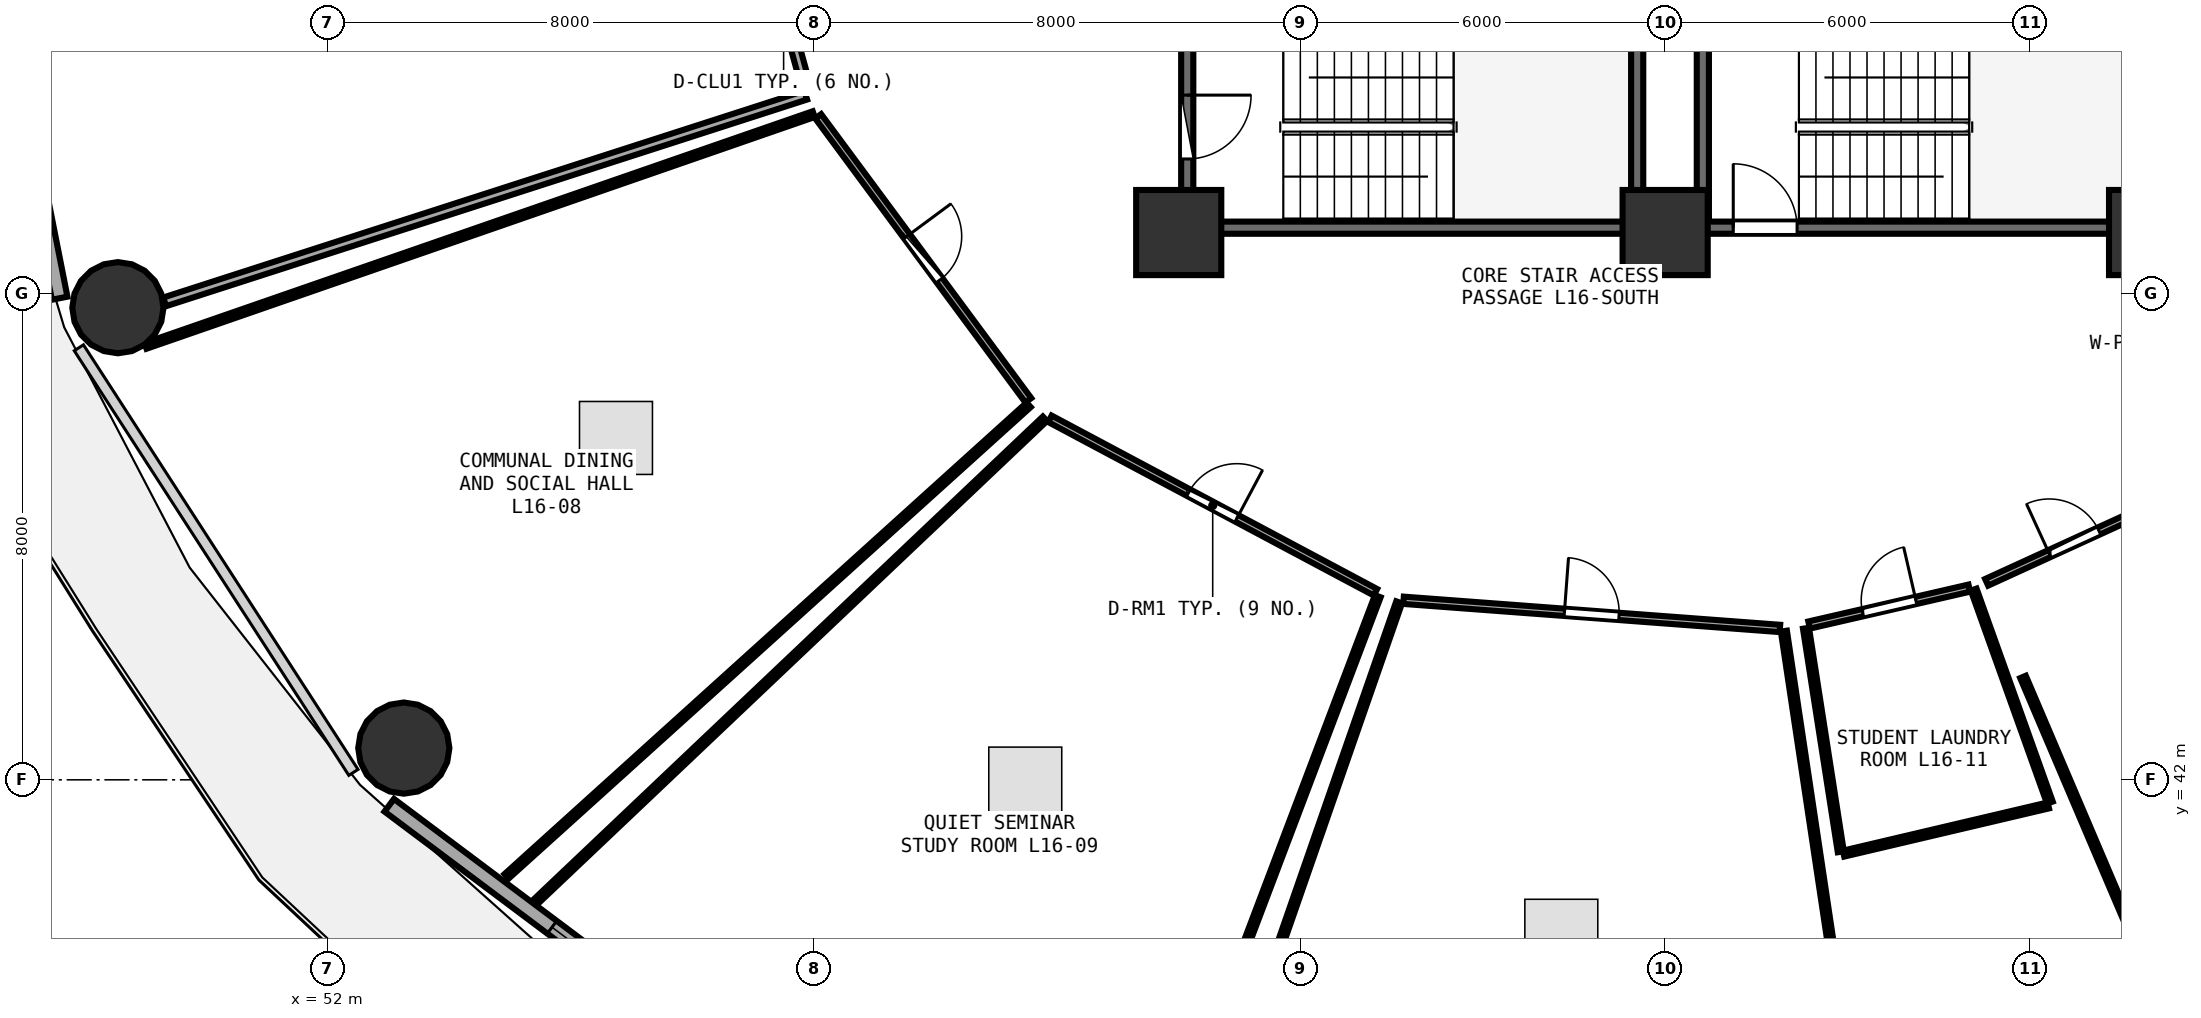
"""IFC4 building model, lengths in metres.
Left out: names, types, materials, properties, quantities, classifications, styles, units other than length and angle.
Written with IfcOpenShell. Run it as: python <this file> out.ifc"""

import sys

from ifc_helpers import new_model, si_unit, direction, frame, frame_2d, origin, origin_2d, place, context, subcontext, project, spatial, rectangle, circle, extrude, element, fill, save


model = new_model("IFC4")
c1 = context("Model", 3, precision=1e-05, world=origin(), true_north=direction((0.0, 1.0)))
c2 = subcontext(c1, "Body", "Model", "MODEL_VIEW")
j1 = project(units=[si_unit("LENGTHUNIT", "METRE"), si_unit("PLANEANGLEUNIT", "RADIAN")], contexts=[c1])
p1 = place(None, origin())
s1 = spatial("IfcSite", under=j1, at=p1, CompositionType="ELEMENT")
p2 = place(p1, origin())
s2 = spatial("IfcBuilding", under=s1, at=p2, CompositionType="ELEMENT")
p3 = place(p2, frame((0.0, 0.0, 63.75)))
s3 = spatial("IfcBuildingStorey", under=s2, at=p3, CompositionType="ELEMENT", Elevation=63.75)
for number, where, z_axis, x_axis in (
    (1, (66.0, 51.0, 0.0), (0.0, 0.0, 1.0), (1.0, 0.0, 0.0)),
    (2, (74.0, 51.0, 0.0), (0.0, 0.0, 1.0), (1.0, 0.0, 0.0)),
    (3, (82.0, 51.0, 0.0), (0.0, 0.0, 1.0), (1.0, 0.0, 0.0)),
):
    element("IfcColumn", number, at=place(p3, frame(where, z_axis=z_axis, x_axis=x_axis)), inside=s3, PredefinedType="PILASTER", context=c2, shape_type="SweptSolid", body=[
        extrude(rectangle(XDim=1.4, YDim=1.4, at=origin_2d()), origin(), (0.0, 0.0, 1.0), 3.75),
    ])
for number, where, z_axis, x_axis in (
    (4, (48.553, 49.764, 0.0), (0.0, 0.0, 1.0), (1.0, 0.0, 0.0)),
    (5, (53.256, 42.522, 0.0), (0.0, 0.0, 1.0), (1.0, 0.0, 0.0)),
):
    element("IfcColumn", number, at=place(p3, frame(where, z_axis=z_axis, x_axis=x_axis)), inside=s3, PredefinedType="COLUMN", context=c2, shape_type="SweptSolid", body=[
        extrude(circle(Radius=0.75, at=origin_2d()), origin(), (0.0, 0.0, 1.0), 3.75),
    ])
p4 = place(p3, frame((46.104, 57.477, 0.0), z_axis=(0.0, 0.0, 1.0), x_axis=(0.193726159581, -0.98105564322, 0.0)))
e6 = element("IfcWall", 6, at=p4, inside=s3, PredefinedType="SOLIDWALL", context=c2, shape_type="SweptSolid", body=[
    extrude(rectangle(XDim=7.703, YDim=0.26, at=frame_2d((3.851, 0.0))), origin(), (0.0, 0.0, 1.0), 3.475),
])
p5 = place(p4, frame((3.051, 0.0, 0.85)))
e7 = element("IfcOpeningElement", 7, at=p5, cuts=e6, PredefinedType="OPENING", context=c2, shape_type="SweptSolid", body=[
    extrude(rectangle(XDim=1.6, YDim=1.45, at=frame_2d((0.8, 0.725))), frame((0.0, 0.14, 0.0), z_axis=(0.0, -1.0, 0.0), x_axis=(1.0, 0.0, 0.0)), (0.0, 0.0, 1.0), 0.28),
])
p6 = place(p3, frame((53.016, 41.582, 0.0), z_axis=(0.0, 0.0, 1.0), x_axis=(0.80030733173, -0.599590005569, 0.0)))
e8 = element("IfcWall", 8, at=p6, inside=s3, PredefinedType="SOLIDWALL", context=c2, shape_type="SweptSolid", body=[
    extrude(rectangle(XDim=8.291, YDim=0.26, at=frame_2d((4.145, 0.0))), origin(), (0.0, 0.0, 1.0), 3.475),
])
p7 = place(p6, frame((3.345, 0.0, 0.85)))
e9 = element("IfcOpeningElement", 9, at=p7, cuts=e8, PredefinedType="OPENING", context=c2, shape_type="SweptSolid", body=[
    extrude(rectangle(XDim=1.6, YDim=1.45, at=frame_2d((0.8, 0.725))), frame((0.0, 0.14, 0.0), z_axis=(0.0, -1.0, 0.0), x_axis=(1.0, 0.0, 0.0)), (0.0, 0.0, 1.0), 0.28),
])
p8 = place(p3, frame((74.0, 51.08, 0.0), z_axis=(0.0, 0.0, 1.0), x_axis=(1.0, 0.0, 0.0)))
e10 = element("IfcWall", 10, at=p8, inside=s3, PredefinedType="SHEAR", context=c2, shape_type="SweptSolid", body=[
    extrude(rectangle(XDim=7.9, YDim=0.2, at=frame_2d((3.95, 0.0))), origin(), (0.0, 0.0, 1.0), 3.49),
])
p9 = place(p8, frame((1.12, 0.0, 0.0)))
e11 = element("IfcOpeningElement", 11, at=p9, cuts=e10, PredefinedType="OPENING", context=c2, shape_type="SweptSolid", body=[
    extrude(rectangle(XDim=1.05, YDim=2.1, at=frame_2d((0.525, 1.05))), frame((0.0, 0.11, 0.0), z_axis=(0.0, -1.0, 0.0), x_axis=(1.0, 0.0, 0.0)), (0.0, 0.0, 1.0), 0.22),
])
p10 = place(p3, frame((74.62, 54.27, 0.0), z_axis=(0.0, 0.0, 1.0), x_axis=(0.0, -1.0, 0.0)))
e12 = element("IfcWall", 12, at=p10, inside=s3, PredefinedType="SHEAR", context=c2, shape_type="SweptSolid", body=[
    extrude(rectangle(XDim=3.07, YDim=0.2, at=frame_2d((1.535, 0.0))), origin(), (0.0, 0.0, 1.0), 3.49),
])
p11 = place(p3, frame((66.26, 51.08, 0.0), z_axis=(0.0, 0.0, 1.0), x_axis=(1.0, 0.0, 0.0)))
e13 = element("IfcWall", 13, at=p11, inside=s3, PredefinedType="SHEAR", context=c2, shape_type="SweptSolid", body=[
    extrude(rectangle(XDim=7.16, YDim=0.2, at=frame_2d((3.58, 0.0))), origin(), (0.0, 0.0, 1.0), 3.49),
])
p12 = place(p3, frame((73.54, 51.2, 0.0), z_axis=(0.0, 0.0, 1.0), x_axis=(0.0, 1.0, 0.0)))
e14 = element("IfcWall", 14, at=p12, inside=s3, PredefinedType="SHEAR", context=c2, shape_type="SweptSolid", body=[
    extrude(rectangle(XDim=3.07, YDim=0.2, at=frame_2d((1.535, 0.0))), origin(), (0.0, 0.0, 1.0), 3.49),
])
p13 = place(p3, frame((66.14, 54.27, 0.0), z_axis=(0.0, 0.0, 1.0), x_axis=(0.0, -1.0, 0.0)))
e15 = element("IfcWall", 15, at=p13, inside=s3, PredefinedType="SHEAR", context=c2, shape_type="SweptSolid", body=[
    extrude(rectangle(XDim=3.07, YDim=0.2, at=frame_2d((1.535, 0.0))), origin(), (0.0, 0.0, 1.0), 3.49),
])
p14 = place(p13, frame((1.01, 0.0, 0.0)))
e16 = element("IfcOpeningElement", 16, at=p14, cuts=e15, PredefinedType="OPENING", context=c2, shape_type="SweptSolid", body=[
    extrude(rectangle(XDim=1.05, YDim=2.1, at=frame_2d((0.525, 1.05))), frame((0.0, 0.11, 0.0), z_axis=(0.0, -1.0, 0.0), x_axis=(1.0, 0.0, 0.0)), (0.0, 0.0, 1.0), 0.22),
])
p15 = place(p3, frame((59.116, 56.155, 0.0), z_axis=(0.0, 0.0, 1.0), x_axis=(0.263653235341, -0.964617526014, 0.0)))
e17 = element("IfcWall", 17, at=p15, inside=s3, PredefinedType="PARTITIONING", context=c2, shape_type="SweptSolid", body=[
    extrude(rectangle(XDim=2.93, YDim=0.15, at=frame_2d((1.465, 0.0))), origin(), (0.0, 0.0, 1.0), 3.48),
])
p16 = place(p15, frame((0.99, 0.0, 0.0)))
e18 = element("IfcOpeningElement", 18, at=p16, cuts=e17, PredefinedType="OPENING", context=c2, shape_type="SweptSolid", body=[
    extrude(rectangle(XDim=0.95, YDim=2.08, at=frame_2d((0.475, 1.04))), frame((0.0, 0.085, 0.0), z_axis=(0.0, -1.0, 0.0), x_axis=(1.0, 0.0, 0.0)), (0.0, 0.0, 1.0), 0.17),
])
p17 = place(p3, frame((60.071, 52.912, 0.0), z_axis=(0.0, 0.0, 1.0), x_axis=(0.594763174801, -0.80390096772, 0.0)))
e19 = element("IfcWall", 19, at=p17, inside=s3, PredefinedType="PARTITIONING", context=c2, shape_type="SweptSolid", body=[
    extrude(rectangle(XDim=5.81, YDim=0.12, at=frame_2d((2.905, 0.0))), origin(), (0.0, 0.0, 1.0), 2.875),
])
p18 = place(p17, frame((2.455, 0.0, 0.0)))
e20 = element("IfcOpeningElement", 20, at=p18, cuts=e19, PredefinedType="OPENING", context=c2, shape_type="SweptSolid", body=[
    extrude(rectangle(XDim=0.9, YDim=2.08, at=frame_2d((0.45, 1.04))), frame((0.0, 0.07, 0.0), z_axis=(0.0, -1.0, 0.0), x_axis=(1.0, 0.0, 0.0)), (0.0, 0.0, 1.0), 0.14),
])
p19 = place(p3, frame((63.882, 47.937, 0.0), z_axis=(0.0, 0.0, 1.0), x_axis=(0.882584601599, -0.470153614279, 0.0)))
e21 = element("IfcWall", 21, at=p19, inside=s3, PredefinedType="PARTITIONING", context=c2, shape_type="SweptSolid", body=[
    extrude(rectangle(XDim=6.065, YDim=0.12, at=frame_2d((3.033, 0.0))), origin(), (0.0, 0.0, 1.0), 2.875),
])
p20 = place(p19, frame((2.583, 0.0, 0.0)))
e22 = element("IfcOpeningElement", 22, at=p20, cuts=e21, PredefinedType="OPENING", context=c2, shape_type="SweptSolid", body=[
    extrude(rectangle(XDim=0.9, YDim=2.08, at=frame_2d((0.45, 1.04))), frame((0.0, 0.07, 0.0), z_axis=(0.0, -1.0, 0.0), x_axis=(1.0, 0.0, 0.0)), (0.0, 0.0, 1.0), 0.14),
])
p21 = place(p3, frame((69.698, 44.952, 0.0), z_axis=(0.0, 0.0, 1.0), x_axis=(0.997215128993, -0.074578726908, 0.0)))
e23 = element("IfcWall", 23, at=p21, inside=s3, PredefinedType="PARTITIONING", context=c2, shape_type="SweptSolid", body=[
    extrude(rectangle(XDim=6.207, YDim=0.12, at=frame_2d((3.104, 0.0))), origin(), (0.0, 0.0, 1.0), 3.235),
])
p22 = place(p21, frame((2.653, 0.0, 0.0)))
e24 = element("IfcOpeningElement", 24, at=p22, cuts=e23, PredefinedType="OPENING", context=c2, shape_type="SweptSolid", body=[
    extrude(rectangle(XDim=0.9, YDim=2.08, at=frame_2d((0.45, 1.04))), frame((0.0, 0.07, 0.0), z_axis=(0.0, -1.0, 0.0), x_axis=(1.0, 0.0, 0.0)), (0.0, 0.0, 1.0), 0.14),
])
p23 = place(p3, frame((76.368, 44.545, 0.0), z_axis=(0.0, 0.0, 1.0), x_axis=(0.974445966729, 0.224622033484, 0.0)))
e25 = element("IfcWall", 25, at=p23, inside=s3, PredefinedType="PARTITIONING", context=c2, shape_type="SweptSolid", body=[
    extrude(rectangle(XDim=2.703, YDim=0.12, at=frame_2d((1.352, 0.0))), origin(), (0.0, 0.0, 1.0), 3.235),
])
p24 = place(p23, frame((0.902, 0.0, 0.0)))
e26 = element("IfcOpeningElement", 26, at=p24, cuts=e25, PredefinedType="OPENING", context=c2, shape_type="SweptSolid", body=[
    extrude(rectangle(XDim=0.9, YDim=2.08, at=frame_2d((0.45, 1.04))), frame((0.0, 0.07, 0.0), z_axis=(0.0, -1.0, 0.0), x_axis=(1.0, 0.0, 0.0)), (0.0, 0.0, 1.0), 0.14),
])
p25 = place(p3, frame((79.288, 45.248, 0.0), z_axis=(0.0, 0.0, 1.0), x_axis=(0.909426123825, 0.415865513483, 0.0)))
e27 = element("IfcWall", 27, at=p25, inside=s3, PredefinedType="PARTITIONING", context=c2, shape_type="SweptSolid", body=[
    extrude(rectangle(XDim=3.164, YDim=0.12, at=frame_2d((1.582, 0.0))), origin(), (0.0, 0.0, 1.0), 2.875),
])
p26 = place(p25, frame((1.132, 0.0, 0.0)))
e28 = element("IfcOpeningElement", 28, at=p26, cuts=e27, PredefinedType="OPENING", context=c2, shape_type="SweptSolid", body=[
    extrude(rectangle(XDim=0.9, YDim=2.08, at=frame_2d((0.45, 1.04))), frame((0.0, 0.07, 0.0), z_axis=(0.0, -1.0, 0.0), x_axis=(1.0, 0.0, 0.0)), (0.0, 0.0, 1.0), 0.14),
])
p27 = place(p3, frame((59.866, 53.259, 0.0), z_axis=(0.0, 0.0, 1.0), x_axis=(-0.951774856366, -0.30679736438, 0.0)))
e29 = element("IfcWall", 29, at=p27, inside=s3, PredefinedType="PARTITIONING", context=c2, shape_type="SweptSolid", body=[
    extrude(rectangle(XDim=11.078, YDim=0.15, at=frame_2d((5.539, 0.0))), origin(), (0.0, 0.0, 1.0), 2.875),
])
p28 = place(p3, frame((63.532, 48.166, 0.0), z_axis=(0.0, 0.0, 1.0), x_axis=(-0.742191353367, -0.670188029577, 0.0)))
e30 = element("IfcWall", 30, at=p28, inside=s3, PredefinedType="PARTITIONING", context=c2, shape_type="SweptSolid", body=[
    extrude(rectangle(XDim=11.569, YDim=0.1, at=frame_2d((5.785, 0.0))), origin(), (0.0, 0.0, 1.0), 2.875),
])
p29 = place(p3, frame((49.008, 49.136, 0.0), z_axis=(0.0, 0.0, 1.0), x_axis=(0.944815756918, 0.327602175634, 0.0)))
e31 = element("IfcWall", 31, at=p29, inside=s3, PredefinedType="PARTITIONING", context=c2, shape_type="SweptSolid", body=[
    extrude(rectangle(XDim=11.632, YDim=0.1, at=frame_2d((5.816, 0.0))), origin(), (0.0, 0.0, 1.0), 2.875),
])
p30 = place(p3, frame((69.274, 45.02, 0.0), z_axis=(0.0, 0.0, 1.0), x_axis=(-0.354325845477, -0.935122021571, 0.0)))
e32 = element("IfcWall", 32, at=p30, inside=s3, PredefinedType="PARTITIONING", context=c2, shape_type="SweptSolid", body=[
    extrude(rectangle(XDim=10.938, YDim=0.1, at=frame_2d((5.469, 0.0))), origin(), (0.0, 0.0, 1.0), 2.875),
])
p31 = place(p3, frame((55.433, 40.003, 0.0), z_axis=(0.0, 0.0, 1.0), x_axis=(0.725627678847, 0.688087546531, 0.0)))
e33 = element("IfcWall", 33, at=p31, inside=s3, PredefinedType="PARTITIONING", context=c2, shape_type="SweptSolid", body=[
    extrude(rectangle(XDim=11.531, YDim=0.1, at=frame_2d((5.765, 0.0))), origin(), (0.0, 0.0, 1.0), 2.875),
])
p32 = place(p3, frame((75.953, 44.445, 0.0), z_axis=(0.0, 0.0, 1.0), x_axis=(0.148282966471, -0.988944974129, 0.0)))
e34 = element("IfcWall", 34, at=p32, inside=s3, PredefinedType="PARTITIONING", context=c2, shape_type="SweptSolid", body=[
    extrude(rectangle(XDim=10.799, YDim=0.1, at=frame_2d((5.399, 0.0))), origin(), (0.0, 0.0, 1.0), 2.875),
])
p33 = place(p3, frame((66.038, 34.612, 0.0), z_axis=(0.0, 0.0, 1.0), x_axis=(0.328662915274, 0.944447292401, 0.0)))
e35 = element("IfcWall", 35, at=p33, inside=s3, PredefinedType="PARTITIONING", context=c2, shape_type="SweptSolid", body=[
    extrude(rectangle(XDim=10.914, YDim=0.1, at=frame_2d((5.457, 0.0))), origin(), (0.0, 0.0, 1.0), 2.875),
])
p34 = place(p3, frame((79.074, 45.128, 0.0), z_axis=(0.0, 0.0, 1.0), x_axis=(0.336806149261, -0.941574010803, 0.0)))
e36 = element("IfcWall", 36, at=p34, inside=s3, PredefinedType="PARTITIONING", context=c2, shape_type="SweptSolid", body=[
    extrude(rectangle(XDim=3.72, YDim=0.1, at=frame_2d((1.86, 0.0))), origin(), (0.0, 0.0, 1.0), 2.875),
])
p35 = place(p3, frame((80.302, 41.579, 0.0), z_axis=(0.0, 0.0, 1.0), x_axis=(-0.973403286496, -0.229098323518, 0.0)))
e37 = element("IfcWall", 37, at=p35, inside=s3, PredefinedType="PARTITIONING", context=c2, shape_type="SweptSolid", body=[
    extrude(rectangle(XDim=3.46, YDim=0.1, at=frame_2d((1.73, 0.0))), origin(), (0.0, 0.0, 1.0), 2.875),
])
p36 = place(p3, frame((76.889, 40.816, 0.0), z_axis=(0.0, 0.0, 1.0), x_axis=(-0.153950475789, 0.988078565198, 0.0)))
e38 = element("IfcWall", 38, at=p36, inside=s3, PredefinedType="PARTITIONING", context=c2, shape_type="SweptSolid", body=[
    extrude(rectangle(XDim=3.72, YDim=0.1, at=frame_2d((1.86, 0.0))), origin(), (0.0, 0.0, 1.0), 3.175),
])
p37 = place(p3, frame((83.553, 35.089, 0.0), z_axis=(0.0, 0.0, 1.0), x_axis=(-0.392154212845, 0.919899490895, 0.0)))
e39 = element("IfcWall", 39, at=p37, inside=s3, PredefinedType="PARTITIONING", context=c2, shape_type="SweptSolid", body=[
    extrude(rectangle(XDim=9.352, YDim=0.1, at=frame_2d((4.676, 0.0))), origin(), (0.0, 0.0, 1.0), 2.875),
])
p38 = place(p7, origin())
e40 = element("IfcWindow", 40, at=p38, inside=s3, PartitioningType="SINGLE_PANEL", PredefinedType="WINDOW", context=c2, shape_type="SweptSolid", body=[
    extrude(rectangle(XDim=1.6, YDim=1.45, at=frame_2d((0.8, 0.725))), frame((0.0, 0.03, 0.0), z_axis=(0.0, -1.0, 0.0), x_axis=(1.0, 0.0, 0.0)), (0.0, 0.0, 1.0), 0.06),
])
fill(e9, e40)
p39 = place(p9, origin())
e41 = element("IfcDoor", 41, at=p39, inside=s3, OperationType="SINGLE_SWING_LEFT", PredefinedType="DOOR", context=c2, shape_type="SweptSolid", body=[
    extrude(rectangle(XDim=1.05, YDim=2.1, at=frame_2d((0.525, 1.05))), frame((0.0, 0.025, 0.0), z_axis=(0.0, -1.0, 0.0), x_axis=(1.0, 0.0, 0.0)), (0.0, 0.0, 1.0), 0.05),
])
fill(e11, e41)
p40 = place(p14, origin())
e42 = element("IfcDoor", 42, at=p40, inside=s3, OperationType="SINGLE_SWING_LEFT", PredefinedType="DOOR", context=c2, shape_type="SweptSolid", body=[
    extrude(rectangle(XDim=1.05, YDim=2.1, at=frame_2d((0.525, 1.05))), frame((0.0, 0.025, 0.0), z_axis=(0.0, -1.0, 0.0), x_axis=(1.0, 0.0, 0.0)), (0.0, 0.0, 1.0), 0.05),
])
fill(e16, e42)
p41 = place(p18, origin())
e43 = element("IfcDoor", 43, at=p41, inside=s3, OperationType="SINGLE_SWING_LEFT", PredefinedType="DOOR", context=c2, shape_type="SweptSolid", body=[
    extrude(rectangle(XDim=0.9, YDim=2.08, at=frame_2d((0.45, 1.04))), frame((0.0, 0.025, 0.0), z_axis=(0.0, -1.0, 0.0), x_axis=(1.0, 0.0, 0.0)), (0.0, 0.0, 1.0), 0.05),
])
fill(e20, e43)
p42 = place(p20, origin())
e44 = element("IfcDoor", 44, at=p42, inside=s3, OperationType="SINGLE_SWING_RIGHT", PredefinedType="DOOR", context=c2, shape_type="SweptSolid", body=[
    extrude(rectangle(XDim=0.9, YDim=2.08, at=frame_2d((0.45, 1.04))), frame((0.0, 0.025, 0.0), z_axis=(0.0, -1.0, 0.0), x_axis=(1.0, 0.0, 0.0)), (0.0, 0.0, 1.0), 0.05),
])
fill(e22, e44)
p43 = place(p22, origin())
e45 = element("IfcDoor", 45, at=p43, inside=s3, OperationType="SINGLE_SWING_LEFT", PredefinedType="DOOR", context=c2, shape_type="SweptSolid", body=[
    extrude(rectangle(XDim=0.9, YDim=2.08, at=frame_2d((0.45, 1.04))), frame((0.0, 0.025, 0.0), z_axis=(0.0, -1.0, 0.0), x_axis=(1.0, 0.0, 0.0)), (0.0, 0.0, 1.0), 0.05),
])
fill(e24, e45)
p44 = place(p24, origin())
e46 = element("IfcDoor", 46, at=p44, inside=s3, OperationType="SINGLE_SWING_RIGHT", PredefinedType="DOOR", context=c2, shape_type="SweptSolid", body=[
    extrude(rectangle(XDim=0.9, YDim=2.08, at=frame_2d((0.45, 1.04))), frame((0.0, 0.025, 0.0), z_axis=(0.0, -1.0, 0.0), x_axis=(1.0, 0.0, 0.0)), (0.0, 0.0, 1.0), 0.05),
])
fill(e26, e46)
p45 = place(p26, origin())
e47 = element("IfcDoor", 47, at=p45, inside=s3, OperationType="SINGLE_SWING_LEFT", PredefinedType="DOOR", context=c2, shape_type="SweptSolid", body=[
    extrude(rectangle(XDim=0.9, YDim=2.08, at=frame_2d((0.45, 1.04))), frame((0.0, 0.025, 0.0), z_axis=(0.0, -1.0, 0.0), x_axis=(1.0, 0.0, 0.0)), (0.0, 0.0, 1.0), 0.05),
])
fill(e28, e47)
save(model, sys.argv[1])
